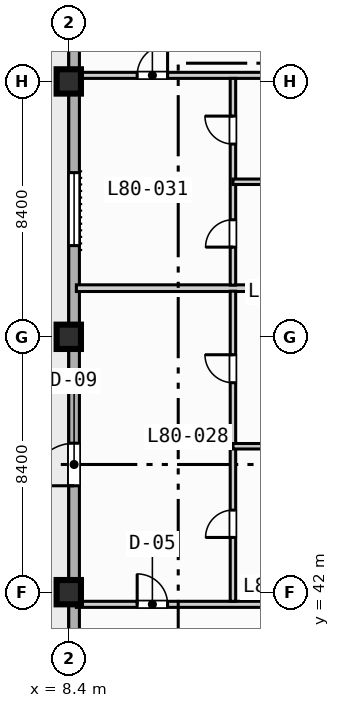
"""IFC4 building model, lengths in metres.
Left out: names, types, materials, properties, quantities, classifications, styles, units other than length and angle.
Written with IfcOpenShell. Run it as: python <this file> out.ifc"""

import sys

from ifc_helpers import new_model, si_unit, direction, frame, frame_2d, origin, origin_2d, place, context, subcontext, project, spatial, rectangle, extrude, element, fill, save


model = new_model("IFC4")
c1 = context("Model", 3, precision=1e-05, world=origin(), true_north=direction((0.0, 1.0)))
c2 = subcontext(c1, "Body", "Model", "MODEL_VIEW")
j1 = project(units=[si_unit("LENGTHUNIT", "METRE"), si_unit("PLANEANGLEUNIT", "RADIAN")], contexts=[c1])
p1 = place(None, origin())
s1 = spatial("IfcSite", under=j1, at=p1, CompositionType="ELEMENT")
p2 = place(p1, origin())
s2 = spatial("IfcBuilding", under=s1, at=p2, CompositionType="ELEMENT")
p3 = place(p2, frame((0.0, 0.0, 324.2)))
s3 = spatial("IfcBuildingStorey", under=s2, at=p3, CompositionType="ELEMENT", Elevation=324.2)
for number, where, z_axis, x_axis in (
    (1, (8.4, 42.0, 0.0), (0.0, 0.0, 1.0), (1.0, 0.0, 0.0)),
    (2, (8.4, 50.4, 0.0), (0.0, 0.0, 1.0), (1.0, 0.0, 0.0)),
    (3, (8.4, 58.8, 0.0), (0.0, 0.0, 1.0), (1.0, 0.0, 0.0)),
):
    element("IfcColumn", number, at=place(p3, frame(where, z_axis=z_axis, x_axis=x_axis)), inside=s3, PredefinedType="COLUMN", context=c2, shape_type="SweptSolid", body=[
        extrude(rectangle(XDim=0.8, YDim=0.8, at=origin_2d()), origin(), (0.0, 0.0, 1.0), 3.9),
    ])
p4 = place(p3, frame((8.575, 11.575, 0.0), z_axis=(0.0, 0.0, 1.0), x_axis=(0.0, 1.0, 0.0)))
e4 = element("IfcWall", 4, at=p4, inside=s3, PredefinedType="STANDARD", context=c2, shape_type="SweptSolid", body=[
    extrude(rectangle(XDim=60.85, YDim=0.35, at=frame_2d((30.425, 0.0))), origin(), (0.0, 0.0, 1.0), 3.67),
])
p5 = place(p4, frame((33.925, 0.0, 0.0)))
e5 = element("IfcOpeningElement", 5, at=p5, cuts=e4, PredefinedType="OPENING", context=c2, shape_type="SweptSolid", body=[
    extrude(rectangle(XDim=1.4, YDim=2.2, at=frame_2d((0.7, 1.1))), frame((0.0, 0.185, 0.0), z_axis=(0.0, -1.0, 0.0), x_axis=(1.0, 0.0, 0.0)), (0.0, 0.0, 1.0), 0.37),
])
p6 = place(p4, frame((16.925, 0.0, 0.85)))
e6 = element("IfcOpeningElement", 6, at=p6, cuts=e4, PredefinedType="OPENING", context=c2, shape_type="SweptSolid", body=[
    extrude(rectangle(XDim=1.8, YDim=1.8, at=frame_2d((0.9, 0.9))), frame((0.0, 0.185, 0.0), z_axis=(0.0, -1.0, 0.0), x_axis=(1.0, 0.0, 0.0)), (0.0, 0.0, 1.0), 0.37),
])
p7 = place(p4, frame((25.025, 0.0, 0.85)))
e7 = element("IfcOpeningElement", 7, at=p7, cuts=e4, PredefinedType="OPENING", context=c2, shape_type="SweptSolid", body=[
    extrude(rectangle(XDim=2.4, YDim=1.95, at=frame_2d((1.2, 0.975))), frame((0.0, 0.185, 0.0), z_axis=(0.0, -1.0, 0.0), x_axis=(1.0, 0.0, 0.0)), (0.0, 0.0, 1.0), 0.37),
])
p8 = place(p4, frame((41.825, 0.0, 0.85)))
e8 = element("IfcOpeningElement", 8, at=p8, cuts=e4, PredefinedType="OPENING", context=c2, shape_type="SweptSolid", body=[
    extrude(rectangle(XDim=2.4, YDim=1.95, at=frame_2d((1.2, 0.975))), frame((0.0, 0.185, 0.0), z_axis=(0.0, -1.0, 0.0), x_axis=(1.0, 0.0, 0.0)), (0.0, 0.0, 1.0), 0.37),
])
p9 = place(p3, frame((8.65, 41.6, 0.0), z_axis=(0.0, 0.0, 1.0), x_axis=(1.0, 0.0, 0.0)))
e9 = element("IfcWall", 9, at=p9, inside=s3, PredefinedType="PARTITIONING", context=c2, shape_type="SweptSolid", body=[
    extrude(rectangle(XDim=7.95, YDim=0.2, at=frame_2d((3.975, 0.0))), origin(), (0.0, 0.0, 1.0), 3.67),
])
p10 = place(p9, frame((2.0, 0.0, 0.0)))
e10 = element("IfcOpeningElement", 10, at=p10, cuts=e9, PredefinedType="OPENING", context=c2, shape_type="SweptSolid", body=[
    extrude(rectangle(XDim=1.0, YDim=2.15, at=frame_2d((0.5, 1.075))), frame((0.0, 0.11, 0.0), z_axis=(0.0, -1.0, 0.0), x_axis=(1.0, 0.0, 0.0)), (0.0, 0.0, 1.0), 0.22),
])
p11 = place(p3, frame((8.65, 59.0, 0.0), z_axis=(0.0, 0.0, 1.0), x_axis=(1.0, 0.0, 0.0)))
e11 = element("IfcWall", 11, at=p11, inside=s3, PredefinedType="PARTITIONING", context=c2, shape_type="SweptSolid", body=[
    extrude(rectangle(XDim=7.95, YDim=0.2, at=frame_2d((3.975, 0.0))), origin(), (0.0, 0.0, 1.0), 3.07),
])
p12 = place(p11, frame((2.0, 0.0, 0.0)))
e12 = element("IfcOpeningElement", 12, at=p12, cuts=e11, PredefinedType="OPENING", context=c2, shape_type="SweptSolid", body=[
    extrude(rectangle(XDim=1.0, YDim=2.15, at=frame_2d((0.5, 1.075))), frame((0.0, 0.11, 0.0), z_axis=(0.0, -1.0, 0.0), x_axis=(1.0, 0.0, 0.0)), (0.0, 0.0, 1.0), 0.22),
])
p13 = place(p3, frame((8.65, 52.0, 0.0), z_axis=(0.0, 0.0, 1.0), x_axis=(1.0, 0.0, 0.0)))
e13 = element("IfcWall", 13, at=p13, inside=s3, PredefinedType="PARTITIONING", context=c2, shape_type="SweptSolid", body=[
    extrude(rectangle(XDim=7.95, YDim=0.22, at=frame_2d((3.975, 0.0))), origin(), (0.0, 0.0, 1.0), 3.67),
])
p14 = place(p3, frame((13.8, 41.7, 0.0), z_axis=(0.0, 0.0, 1.0), x_axis=(0.0, 1.0, 0.0)))
e14 = element("IfcWall", 14, at=p14, inside=s3, PredefinedType="PLUMBINGWALL", context=c2, shape_type="SweptSolid", body=[
    extrude(rectangle(XDim=10.2, YDim=0.18, at=frame_2d((5.1, 0.0))), origin(), (0.0, 0.0, 1.0), 3.67),
])
p15 = place(p14, frame((2.1, 0.0, 0.0)))
e15 = element("IfcOpeningElement", 15, at=p15, cuts=e14, PredefinedType="OPENING", context=c2, shape_type="SweptSolid", body=[
    extrude(rectangle(XDim=0.9, YDim=2.1, at=frame_2d((0.45, 1.05))), frame((0.0, 0.1, 0.0), z_axis=(0.0, -1.0, 0.0), x_axis=(1.0, 0.0, 0.0)), (0.0, 0.0, 1.0), 0.2),
])
p16 = place(p14, frame((7.19, 0.0, 0.0)))
e16 = element("IfcOpeningElement", 16, at=p16, cuts=e14, PredefinedType="OPENING", context=c2, shape_type="SweptSolid", body=[
    extrude(rectangle(XDim=0.92, YDim=2.1, at=frame_2d((0.46, 1.05))), frame((0.0, 0.1, 0.0), z_axis=(0.0, -1.0, 0.0), x_axis=(1.0, 0.0, 0.0)), (0.0, 0.0, 1.0), 0.2),
])
p17 = place(p3, frame((13.8, 46.8, 0.0), z_axis=(0.0, 0.0, 1.0), x_axis=(1.0, 0.0, 0.0)))
e17 = element("IfcWall", 17, at=p17, inside=s3, PredefinedType="PLUMBINGWALL", context=c2, shape_type="SweptSolid", body=[
    extrude(rectangle(XDim=2.8, YDim=0.18, at=frame_2d((1.4, 0.0))), origin(), (0.0, 0.0, 1.0), 3.67),
])
p18 = place(p3, frame((13.8, 52.1, 0.0), z_axis=(0.0, 0.0, 1.0), x_axis=(0.0, 1.0, 0.0)))
e18 = element("IfcWall", 18, at=p18, inside=s3, PredefinedType="PLUMBINGWALL", context=c2, shape_type="SweptSolid", body=[
    extrude(rectangle(XDim=6.8, YDim=0.18, at=frame_2d((3.4, 0.0))), origin(), (0.0, 0.0, 1.0), 3.67),
])
p19 = place(p18, frame((1.25, 0.0, 0.0)))
e19 = element("IfcOpeningElement", 19, at=p19, cuts=e18, PredefinedType="OPENING", context=c2, shape_type="SweptSolid", body=[
    extrude(rectangle(XDim=0.9, YDim=2.1, at=frame_2d((0.45, 1.05))), frame((0.0, 0.1, 0.0), z_axis=(0.0, -1.0, 0.0), x_axis=(1.0, 0.0, 0.0)), (0.0, 0.0, 1.0), 0.2),
])
p20 = place(p18, frame((4.64, 0.0, 0.0)))
e20 = element("IfcOpeningElement", 20, at=p20, cuts=e18, PredefinedType="OPENING", context=c2, shape_type="SweptSolid", body=[
    extrude(rectangle(XDim=0.92, YDim=2.1, at=frame_2d((0.46, 1.05))), frame((0.0, 0.1, 0.0), z_axis=(0.0, -1.0, 0.0), x_axis=(1.0, 0.0, 0.0)), (0.0, 0.0, 1.0), 0.2),
])
p21 = place(p3, frame((13.8, 55.5, 0.0), z_axis=(0.0, 0.0, 1.0), x_axis=(1.0, 0.0, 0.0)))
e21 = element("IfcWall", 21, at=p21, inside=s3, PredefinedType="PLUMBINGWALL", context=c2, shape_type="SweptSolid", body=[
    extrude(rectangle(XDim=2.8, YDim=0.18, at=frame_2d((1.4, 0.0))), origin(), (0.0, 0.0, 1.0), 3.67),
])
p22 = place(p5, origin())
e22 = element("IfcDoor", 22, at=p22, inside=s3, OperationType="SINGLE_SWING_LEFT", PredefinedType="DOOR", context=c2, shape_type="SweptSolid", body=[
    extrude(rectangle(XDim=1.4, YDim=2.2, at=frame_2d((0.7, 1.1))), frame((0.0, 0.025, 0.0), z_axis=(0.0, -1.0, 0.0), x_axis=(1.0, 0.0, 0.0)), (0.0, 0.0, 1.0), 0.05),
])
fill(e5, e22)
p23 = place(p8, origin())
e23 = element("IfcWindow", 23, at=p23, inside=s3, PartitioningType="SINGLE_PANEL", PredefinedType="WINDOW", context=c2, shape_type="SweptSolid", body=[
    extrude(rectangle(XDim=2.4, YDim=1.95, at=frame_2d((1.2, 0.975))), frame((0.0, 0.03, 0.0), z_axis=(0.0, -1.0, 0.0), x_axis=(1.0, 0.0, 0.0)), (0.0, 0.0, 1.0), 0.06),
])
fill(e8, e23)
p24 = place(p10, origin())
e24 = element("IfcDoor", 24, at=p24, inside=s3, OperationType="SINGLE_SWING_LEFT", PredefinedType="DOOR", context=c2, shape_type="SweptSolid", body=[
    extrude(rectangle(XDim=1.0, YDim=2.15, at=frame_2d((0.5, 1.075))), frame((0.0, 0.025, 0.0), z_axis=(0.0, -1.0, 0.0), x_axis=(1.0, 0.0, 0.0)), (0.0, 0.0, 1.0), 0.05),
])
fill(e10, e24)
p25 = place(p12, origin())
e25 = element("IfcDoor", 25, at=p25, inside=s3, OperationType="SINGLE_SWING_RIGHT", PredefinedType="DOOR", context=c2, shape_type="SweptSolid", body=[
    extrude(rectangle(XDim=1.0, YDim=2.15, at=frame_2d((0.5, 1.075))), frame((0.0, 0.025, 0.0), z_axis=(0.0, -1.0, 0.0), x_axis=(1.0, 0.0, 0.0)), (0.0, 0.0, 1.0), 0.05),
])
fill(e12, e25)
p26 = place(p15, origin())
e26 = element("IfcDoor", 26, at=p26, inside=s3, OperationType="SINGLE_SWING_LEFT", PredefinedType="DOOR", context=c2, shape_type="SweptSolid", body=[
    extrude(rectangle(XDim=0.9, YDim=2.1, at=frame_2d((0.45, 1.05))), frame((0.0, 0.025, 0.0), z_axis=(0.0, -1.0, 0.0), x_axis=(1.0, 0.0, 0.0)), (0.0, 0.0, 1.0), 0.05),
])
fill(e15, e26)
p27 = place(p16, origin())
e27 = element("IfcDoor", 27, at=p27, inside=s3, OperationType="SINGLE_SWING_RIGHT", PredefinedType="DOOR", context=c2, shape_type="SweptSolid", body=[
    extrude(rectangle(XDim=0.92, YDim=2.1, at=frame_2d((0.46, 1.05))), frame((0.0, 0.025, 0.0), z_axis=(0.0, -1.0, 0.0), x_axis=(1.0, 0.0, 0.0)), (0.0, 0.0, 1.0), 0.05),
])
fill(e16, e27)
p28 = place(p19, origin())
e28 = element("IfcDoor", 28, at=p28, inside=s3, OperationType="SINGLE_SWING_LEFT", PredefinedType="DOOR", context=c2, shape_type="SweptSolid", body=[
    extrude(rectangle(XDim=0.9, YDim=2.1, at=frame_2d((0.45, 1.05))), frame((0.0, 0.025, 0.0), z_axis=(0.0, -1.0, 0.0), x_axis=(1.0, 0.0, 0.0)), (0.0, 0.0, 1.0), 0.05),
])
fill(e19, e28)
p29 = place(p20, origin())
e29 = element("IfcDoor", 29, at=p29, inside=s3, OperationType="SINGLE_SWING_RIGHT", PredefinedType="DOOR", context=c2, shape_type="SweptSolid", body=[
    extrude(rectangle(XDim=0.92, YDim=2.1, at=frame_2d((0.46, 1.05))), frame((0.0, 0.025, 0.0), z_axis=(0.0, -1.0, 0.0), x_axis=(1.0, 0.0, 0.0)), (0.0, 0.0, 1.0), 0.05),
])
fill(e20, e29)
save(model, sys.argv[1])
